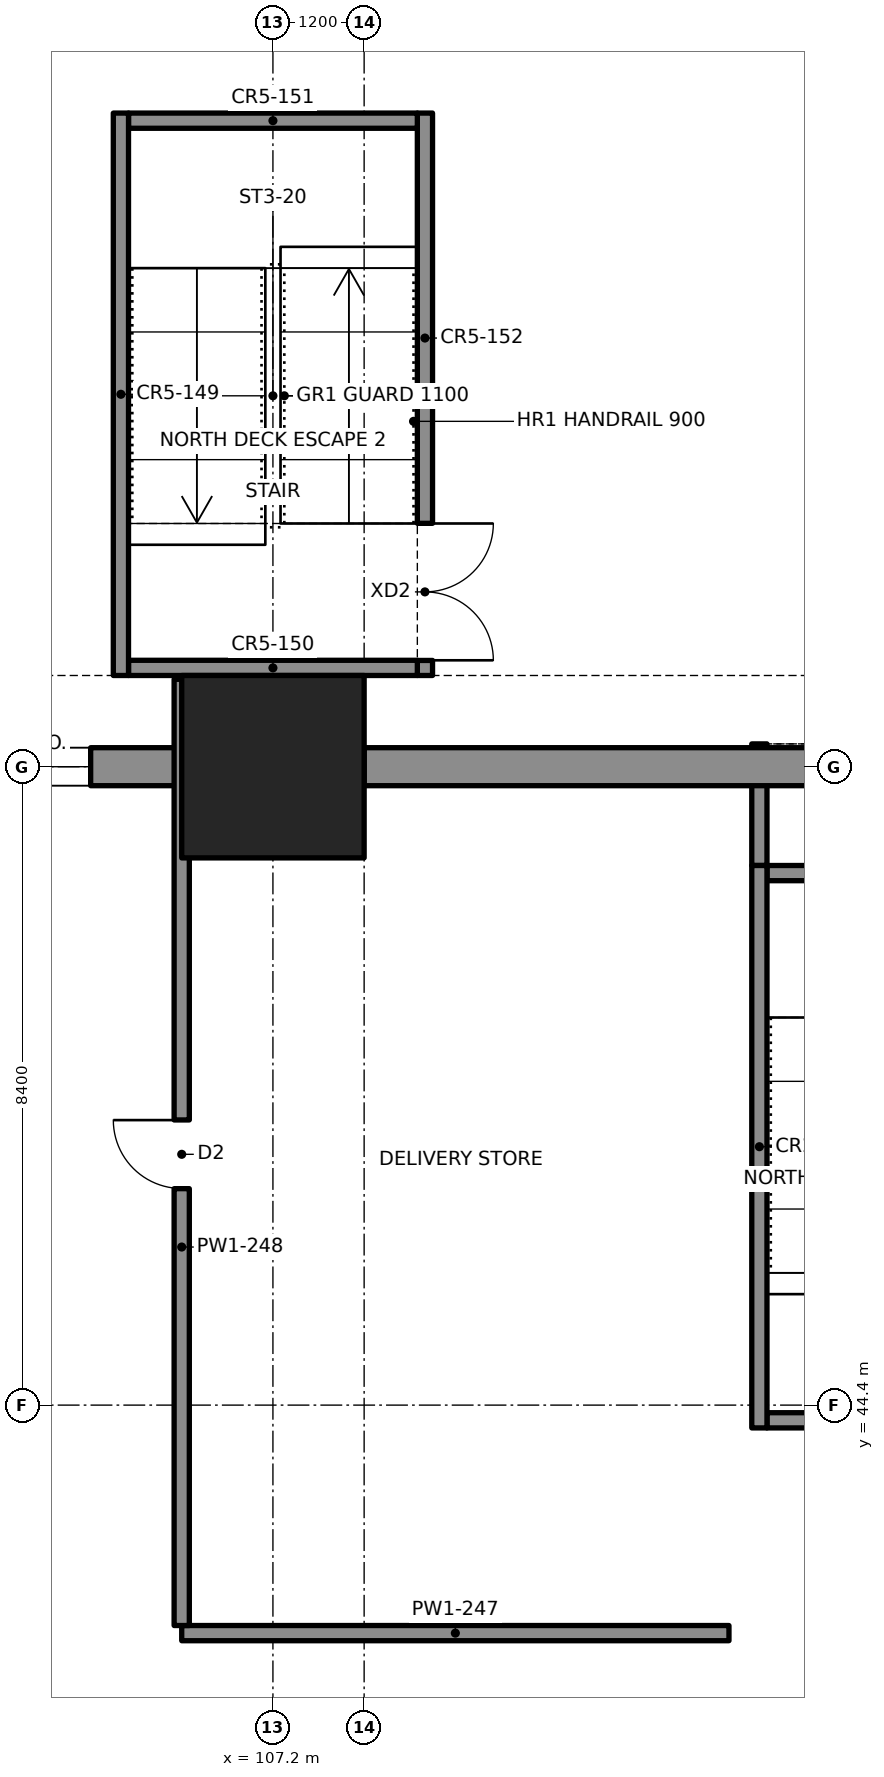
"""IFC4 building model, lengths in metres.
Left out: names, types, materials, properties, quantities, classifications, styles, units other than length and angle.
Written with IfcOpenShell. Run it as: python <this file> out.ifc"""

import sys

from ifc_helpers import new_model, si_unit, direction, frame, frame_2d, origin, origin_2d, place, context, subcontext, project, spatial, rectangle, extrude, element, fill, save


model = new_model("IFC4")
c1 = context("Model", 3, precision=1e-05, world=origin(), true_north=direction((0.0, 1.0)))
c2 = subcontext(c1, "Body", "Model", "MODEL_VIEW")
j1 = project(units=[si_unit("LENGTHUNIT", "METRE"), si_unit("PLANEANGLEUNIT", "RADIAN")], contexts=[c1])
p1 = place(None, origin())
s1 = spatial("IfcSite", under=j1, at=p1, CompositionType="ELEMENT")
p2 = place(p1, origin())
s2 = spatial("IfcBuilding", under=s1, at=p2, CompositionType="ELEMENT")
p3 = place(p2, origin())
s3 = spatial("IfcBuildingStorey", under=s2, at=p3, CompositionType="ELEMENT", Elevation=0.0)
p4 = place(p3, frame((107.2, 52.8, -0.9), z_axis=(0.0, 0.0, 1.0), x_axis=(1.0, 0.0, 0.0)))
e1 = element("IfcColumn", 1, at=p4, inside=s3, PredefinedType="COLUMN", context=c2, shape_type="SweptSolid", body=[
    extrude(rectangle(XDim=2.4, YDim=2.4, at=origin_2d()), origin(), (0.0, 0.0, 1.0), 5.3),
])
p5 = place(p3, frame((91.6, 52.8, 0.0), z_axis=(0.0, 0.0, 1.0), x_axis=(1.0, 0.0, 0.0)))
e2 = element("IfcWall", 2, at=p5, inside=s3, PredefinedType="SOLIDWALL", context=c2, shape_type="SweptSolid", body=[
    extrude(rectangle(XDim=14.4, YDim=0.5, at=frame_2d((7.2, 0.0))), origin(), (0.0, 0.0, 1.0), 3.65),
])
p6 = place(p5, frame((1.2, 0.0, 0.45)))
e3 = element("IfcOpeningElement", 3, at=p6, cuts=e2, PredefinedType="OPENING", context=c2, shape_type="SweptSolid", body=[
    extrude(rectangle(XDim=2.4, YDim=2.7, at=frame_2d((1.2, 1.35))), frame((0.0, 0.26, 0.0), z_axis=(0.0, -1.0, 0.0), x_axis=(1.0, 0.0, 0.0)), (0.0, 0.0, 1.0), 0.52),
])
p7 = place(p5, frame((10.8, 0.0, 0.45)))
e4 = element("IfcOpeningElement", 4, at=p7, cuts=e2, PredefinedType="OPENING", context=c2, shape_type="SweptSolid", body=[
    extrude(rectangle(XDim=2.4, YDim=2.7, at=frame_2d((1.2, 1.35))), frame((0.0, 0.26, 0.0), z_axis=(0.0, -1.0, 0.0), x_axis=(1.0, 0.0, 0.0)), (0.0, 0.0, 1.0), 0.52),
])
p8 = place(p5, frame((5.4, 0.0, 0.0)))
e5 = element("IfcOpeningElement", 5, at=p8, cuts=e2, PredefinedType="OPENING", context=c2, shape_type="SweptSolid", body=[
    extrude(rectangle(XDim=3.6, YDim=2.7, at=frame_2d((1.8, 1.35))), frame((0.0, 0.26, 0.0), z_axis=(0.0, -1.0, 0.0), x_axis=(1.0, 0.0, 0.0)), (0.0, 0.0, 1.0), 0.52),
])
p9 = place(p3, frame((108.4, 52.8, 0.0), z_axis=(0.0, 0.0, 1.0), x_axis=(1.0, 0.0, 0.0)))
e6 = element("IfcWall", 6, at=p9, inside=s3, PredefinedType="SOLIDWALL", context=c2, shape_type="SweptSolid", body=[
    extrude(rectangle(XDim=14.4, YDim=0.5, at=frame_2d((7.2, 0.0))), origin(), (0.0, 0.0, 1.0), 3.65),
])
p10 = place(p9, frame((6.3, 0.0, 0.0)))
e7 = element("IfcOpeningElement", 7, at=p10, cuts=e6, PredefinedType="OPENING", context=c2, shape_type="SweptSolid", body=[
    extrude(rectangle(XDim=1.8, YDim=2.4, at=frame_2d((0.9, 1.2))), frame((0.0, 0.26, 0.0), z_axis=(0.0, -1.0, 0.0), x_axis=(1.0, 0.0, 0.0)), (0.0, 0.0, 1.0), 0.52),
])
p11 = place(p3, frame((105.2, 54.0, 0.0), z_axis=(0.0, 0.0, 1.0), x_axis=(0.0, 1.0, 0.0)))
e8 = element("IfcWall", 8, at=p11, inside=s3, PredefinedType="SOLIDWALL", context=c2, shape_type="SweptSolid", body=[
    extrude(rectangle(XDim=7.4, YDim=0.2, at=frame_2d((3.7, 0.0))), origin(), (0.0, 0.0, 1.0), 4.4),
])
p12 = place(p3, frame((109.2, 61.4, 0.0), z_axis=(0.0, 0.0, 1.0), x_axis=(0.0, -1.0, 0.0)))
e9 = element("IfcWall", 9, at=p12, inside=s3, PredefinedType="SOLIDWALL", context=c2, shape_type="SweptSolid", body=[
    extrude(rectangle(XDim=7.4, YDim=0.2, at=frame_2d((3.7, 0.0))), origin(), (0.0, 0.0, 1.0), 4.4),
])
p13 = place(p12, frame((5.4, 0.0, 0.0)))
e10 = element("IfcOpeningElement", 10, at=p13, cuts=e9, PredefinedType="OPENING", context=c2, shape_type="SweptSolid", body=[
    extrude(rectangle(XDim=1.8, YDim=2.1, at=frame_2d((0.9, 1.05))), frame((0.0, 0.11, 0.0), z_axis=(0.0, -1.0, 0.0), x_axis=(1.0, 0.0, 0.0)), (0.0, 0.0, 1.0), 0.22),
])
for number, where, z_axis, x_axis in (
    (11, (105.3, 54.1, 0.0), (0.0, 0.0, 1.0), (1.0, 0.0, 0.0)),
    (12, (105.3, 61.3, 0.0), (0.0, 0.0, 1.0), (1.0, 0.0, 0.0)),
):
    element("IfcWall", number, at=place(p3, frame(where, z_axis=z_axis, x_axis=x_axis)), inside=s3, PredefinedType="SOLIDWALL", context=c2, shape_type="SweptSolid", body=[
        extrude(rectangle(XDim=3.8, YDim=0.2, at=frame_2d((1.9, 0.0))), origin(), (0.0, 0.0, 1.0), 4.4),
    ])
p14 = place(p3, frame((113.6, 44.1, 0.0), z_axis=(0.0, 0.0, 1.0), x_axis=(0.0, 1.0, 0.0)))
e13 = element("IfcWall", 13, at=p14, inside=s3, PredefinedType="SOLIDWALL", context=c2, shape_type="SweptSolid", body=[
    extrude(rectangle(XDim=7.4, YDim=0.2, at=frame_2d((3.7, 0.0))), origin(), (0.0, 0.0, 1.0), 4.4),
])
p15 = place(p3, frame((113.7, 44.2, 0.0), z_axis=(0.0, 0.0, 1.0), x_axis=(1.0, 0.0, 0.0)))
e14 = element("IfcWall", 14, at=p15, inside=s3, PredefinedType="SOLIDWALL", context=c2, shape_type="SweptSolid", body=[
    extrude(rectangle(XDim=3.8, YDim=0.2, at=frame_2d((1.9, 0.0))), origin(), (0.0, 0.0, 1.0), 4.4),
])
p16 = place(p3, frame((113.7, 51.4, 0.0), z_axis=(0.0, 0.0, 1.0), x_axis=(1.0, 0.0, 0.0)))
e15 = element("IfcWall", 15, at=p16, inside=s3, PredefinedType="SOLIDWALL", context=c2, shape_type="SweptSolid", body=[
    extrude(rectangle(XDim=3.8, YDim=0.2, at=frame_2d((1.9, 0.0))), origin(), (0.0, 0.0, 1.0), 4.4),
])
p17 = place(p16, frame((1.05, 0.0, 0.0)))
e16 = element("IfcOpeningElement", 16, at=p17, cuts=e15, PredefinedType="OPENING", context=c2, shape_type="SweptSolid", body=[
    extrude(rectangle(XDim=1.7, YDim=2.1, at=frame_2d((0.85, 1.05))), frame((0.0, 0.11, 0.0), z_axis=(0.0, -1.0, 0.0), x_axis=(1.0, 0.0, 0.0)), (0.0, 0.0, 1.0), 0.22),
])
p18 = place(p3, frame((113.6, 51.5, 0.0), z_axis=(0.0, 0.0, 1.0), x_axis=(0.0, 1.0, 0.0)))
e17 = element("IfcWall", 17, at=p18, inside=s3, PredefinedType="SOLIDWALL", context=c2, shape_type="SweptSolid", body=[
    extrude(rectangle(XDim=1.6, YDim=0.2, at=frame_2d((0.8, 0.0))), origin(), (0.0, 0.0, 1.0), 4.4),
])
p19 = place(p3, frame((106.0, 41.4, 0.0), z_axis=(0.0, 0.0, 1.0), x_axis=(1.0, 0.0, 0.0)))
e18 = element("IfcWall", 18, at=p19, inside=s3, PredefinedType="PARTITIONING", context=c2, shape_type="SweptSolid", body=[
    extrude(rectangle(XDim=7.2, YDim=0.2, at=frame_2d((3.6, 0.0))), origin(), (0.0, 0.0, 1.0), 3.65),
])
p20 = place(p3, frame((106.0, 41.5, 0.0), z_axis=(0.0, 0.0, 1.0), x_axis=(0.0, 1.0, 0.0)))
e19 = element("IfcWall", 19, at=p20, inside=s3, PredefinedType="PARTITIONING", context=c2, shape_type="SweptSolid", body=[
    extrude(rectangle(XDim=12.45, YDim=0.2, at=frame_2d((6.225, 0.0))), origin(), (0.0, 0.0, 1.0), 3.65),
])
p21 = place(p20, frame((5.75, 0.0, 0.0)))
e20 = element("IfcOpeningElement", 20, at=p21, cuts=e19, PredefinedType="OPENING", context=c2, shape_type="SweptSolid", body=[
    extrude(rectangle(XDim=0.9, YDim=2.1, at=frame_2d((0.45, 1.05))), frame((0.0, 0.11, 0.0), z_axis=(0.0, -1.0, 0.0), x_axis=(1.0, 0.0, 0.0)), (0.0, 0.0, 1.0), 0.22),
])
p22 = place(p7, origin())
e21 = element("IfcWindow", 21, at=p22, inside=s3, PartitioningType="SINGLE_PANEL", PredefinedType="WINDOW", context=c2, shape_type="SweptSolid", body=[
    extrude(rectangle(XDim=2.4, YDim=2.7, at=frame_2d((1.2, 1.35))), frame((0.0, 0.03, 0.0), z_axis=(0.0, -1.0, 0.0), x_axis=(1.0, 0.0, 0.0)), (0.0, 0.0, 1.0), 0.06),
])
fill(e4, e21)
p23 = place(p13, origin())
e22 = element("IfcDoor", 22, at=p23, inside=s3, OperationType="DOUBLE_DOOR_SINGLE_SWING", PredefinedType="DOOR", context=c2, shape_type="SweptSolid", body=[
    extrude(rectangle(XDim=1.8, YDim=2.1, at=frame_2d((0.9, 1.05))), frame((0.0, 0.025, 0.0), z_axis=(0.0, -1.0, 0.0), x_axis=(1.0, 0.0, 0.0)), (0.0, 0.0, 1.0), 0.05),
])
fill(e10, e22)
p24 = place(p21, origin())
e23 = element("IfcDoor", 23, at=p24, inside=s3, OperationType="SINGLE_SWING_RIGHT", PredefinedType="DOOR", context=c2, shape_type="SweptSolid", body=[
    extrude(rectangle(XDim=0.9, YDim=2.1, at=frame_2d((0.45, 1.05))), frame((0.0, 0.025, 0.0), z_axis=(0.0, -1.0, 0.0), x_axis=(1.0, 0.0, 0.0)), (0.0, 0.0, 1.0), 0.05),
])
fill(e20, e23)
save(model, sys.argv[1])
